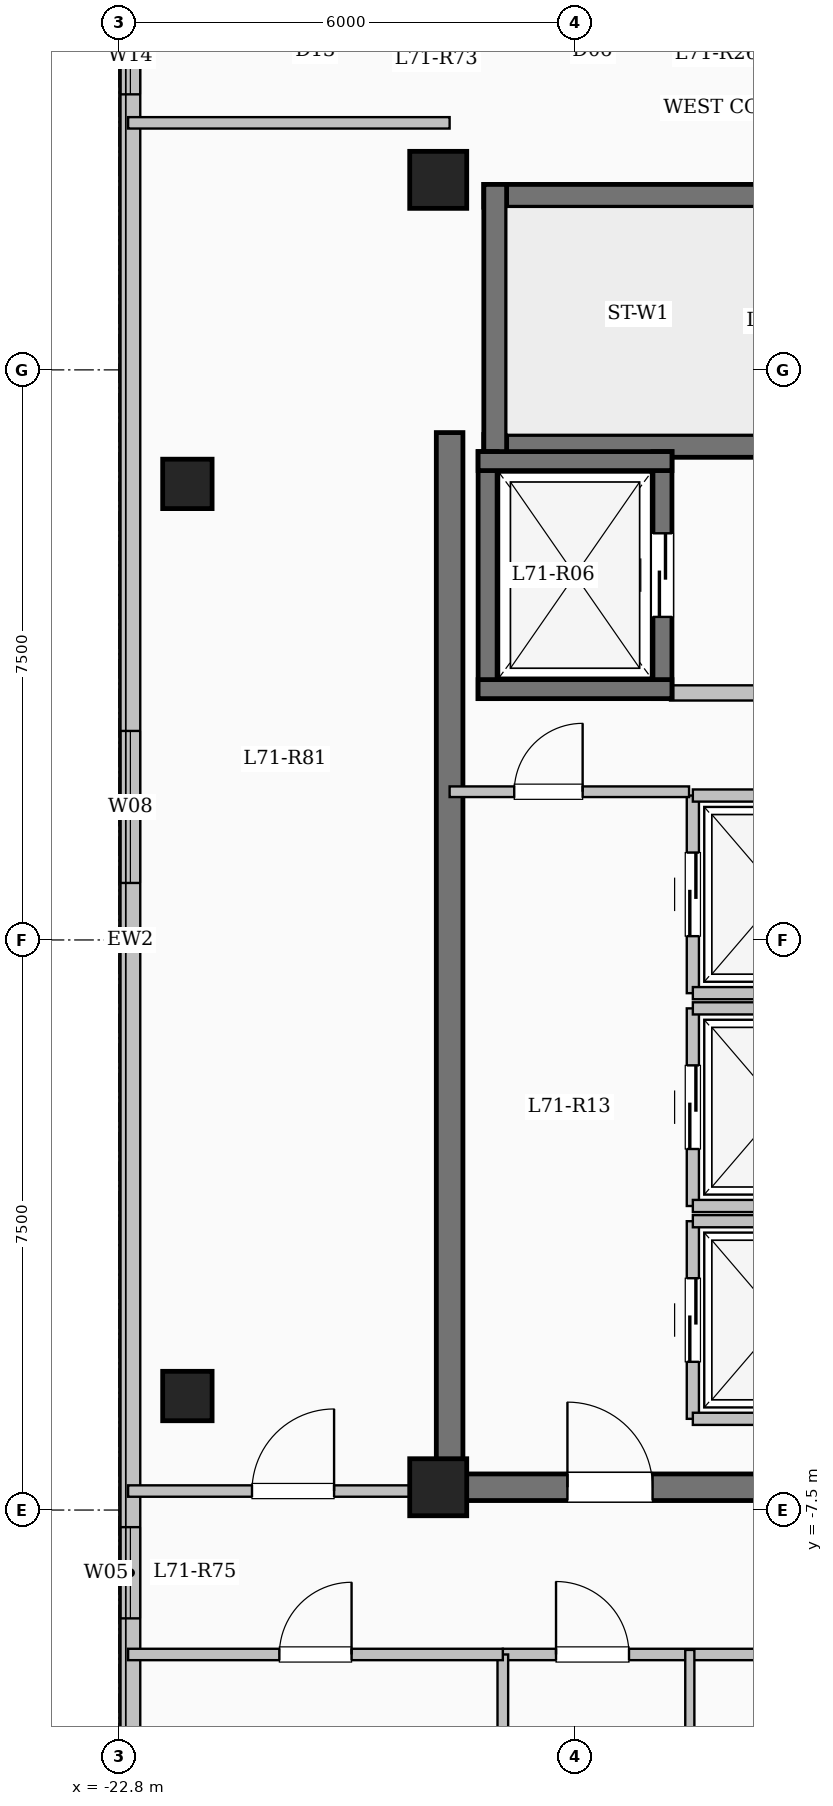
"""IFC4 building model, lengths in metres.
Left out: names, types, materials, properties, quantities, classifications, styles, units other than length and angle.
Written with IfcOpenShell. Run it as: python <this file> out.ifc"""

import sys

from ifc_helpers import new_model, si_unit, direction, frame, frame_2d, origin, origin_2d, place, context, subcontext, project, spatial, rectangle, extrude, element, fill, save


model = new_model("IFC4")
c1 = context("Model", 3, precision=1e-05, world=origin(), true_north=direction((0.0, 1.0)))
c2 = subcontext(c1, "Body", "Model", "MODEL_VIEW")
j1 = project(units=[si_unit("LENGTHUNIT", "METRE"), si_unit("PLANEANGLEUNIT", "RADIAN")], contexts=[c1])
p1 = place(None, origin())
s1 = spatial("IfcSite", under=j1, at=p1, CompositionType="ELEMENT")
p2 = place(p1, origin())
s2 = spatial("IfcBuilding", under=s1, at=p2, CompositionType="ELEMENT")
p3 = place(p2, frame((0.0, 0.0, 261.6)))
s3 = spatial("IfcBuildingStorey", under=s2, at=p3, CompositionType="ELEMENT", Elevation=261.6)
for number, where, z_axis, x_axis in (
    (1, (-18.6, -7.2, 0.0), (0.0, 0.0, 1.0), (1.0, 0.0, 0.0)),
    (2, (-18.6, 10.0, 0.0), (0.0, 0.0, 1.0), (1.0, 0.0, 0.0)),
):
    element("IfcColumn", number, at=place(p3, frame(where, z_axis=z_axis, x_axis=x_axis)), inside=s3, PredefinedType="COLUMN", context=c2, shape_type="SweptSolid", body=[
        extrude(rectangle(XDim=0.75, YDim=0.75, at=origin_2d()), origin(), (0.0, 0.0, 1.0), 3.35),
    ])
for number, where, z_axis, x_axis in (
    (3, (-21.9, -6.0, 0.0), (0.0, 0.0, 1.0), (1.0, 0.0, 0.0)),
    (4, (-21.9, 6.0, 0.0), (0.0, 0.0, 1.0), (1.0, 0.0, 0.0)),
):
    element("IfcColumn", number, at=place(p3, frame(where, z_axis=z_axis, x_axis=x_axis)), inside=s3, PredefinedType="COLUMN", context=c2, shape_type="SweptSolid", body=[
        extrude(rectangle(XDim=0.65, YDim=0.65, at=origin_2d()), origin(), (0.0, 0.0, 1.0), 3.35),
    ])
p4 = place(p3, frame((-22.65, -17.55, 0.0), z_axis=(0.0, 0.0, 1.0), x_axis=(0.0, 1.0, 0.0)))
e5 = element("IfcWall", 5, at=p4, inside=s3, PredefinedType="SOLIDWALL", context=c2, shape_type="SweptSolid", body=[
    extrude(rectangle(XDim=35.1, YDim=0.26, at=frame_2d((17.55, 0.0))), origin(), (0.0, 0.0, 1.0), 3.1),
])
p5 = place(p4, frame((2.975, 0.0, 0.9)))
e6 = element("IfcOpeningElement", 6, at=p5, cuts=e5, PredefinedType="OPENING", context=c2, shape_type="SweptSolid", body=[
    extrude(rectangle(XDim=2.2, YDim=1.75, at=frame_2d((1.1, 0.875))), frame((0.0, 0.14, 0.0), z_axis=(0.0, -1.0, 0.0), x_axis=(1.0, 0.0, 0.0)), (0.0, 0.0, 1.0), 0.28),
])
p6 = place(p4, frame((8.625, 0.0, 0.95)))
e7 = element("IfcOpeningElement", 7, at=p6, cuts=e5, PredefinedType="OPENING", context=c2, shape_type="SweptSolid", body=[
    extrude(rectangle(XDim=1.2, YDim=1.5, at=frame_2d((0.6, 0.75))), frame((0.0, 0.14, 0.0), z_axis=(0.0, -1.0, 0.0), x_axis=(1.0, 0.0, 0.0)), (0.0, 0.0, 1.0), 0.28),
])
p7 = place(p4, frame((18.3, 0.0, 0.9)))
e8 = element("IfcOpeningElement", 8, at=p7, cuts=e5, PredefinedType="OPENING", context=c2, shape_type="SweptSolid", body=[
    extrude(rectangle(XDim=2.0, YDim=1.7, at=frame_2d((1.0, 0.85))), frame((0.0, 0.14, 0.0), z_axis=(0.0, -1.0, 0.0), x_axis=(1.0, 0.0, 0.0)), (0.0, 0.0, 1.0), 0.28),
])
p8 = place(p4, frame((28.675, 0.0, 0.95)))
e9 = element("IfcOpeningElement", 9, at=p8, cuts=e5, PredefinedType="OPENING", context=c2, shape_type="SweptSolid", body=[
    extrude(rectangle(XDim=1.0, YDim=1.5, at=frame_2d((0.5, 0.75))), frame((0.0, 0.14, 0.0), z_axis=(0.0, -1.0, 0.0), x_axis=(1.0, 0.0, 0.0)), (0.0, 0.0, 1.0), 0.28),
])
p9 = place(p4, frame((31.6, 0.0, 0.9)))
e10 = element("IfcOpeningElement", 10, at=p9, cuts=e5, PredefinedType="OPENING", context=c2, shape_type="SweptSolid", body=[
    extrude(rectangle(XDim=2.0, YDim=1.7, at=frame_2d((1.0, 0.85))), frame((0.0, 0.14, 0.0), z_axis=(0.0, -1.0, 0.0), x_axis=(1.0, 0.0, 0.0)), (0.0, 0.0, 1.0), 0.28),
])
p10 = place(p3, frame((-18.0, 9.79, 0.0), z_axis=(0.0, 0.0, 1.0), x_axis=(1.0, 0.0, 0.0)))
e11 = element("IfcWall", 11, at=p10, inside=s3, PredefinedType="SHEAR", context=c2, shape_type="SweptSolid", body=[
    extrude(rectangle(XDim=8.0, YDim=0.3, at=frame_2d((4.0, 0.0))), origin(), (0.0, 0.0, 1.0), 3.35),
])
p11 = place(p3, frame((-18.0, 6.5, 0.0), z_axis=(0.0, 0.0, 1.0), x_axis=(1.0, 0.0, 0.0)))
e12 = element("IfcWall", 12, at=p11, inside=s3, PredefinedType="SHEAR", context=c2, shape_type="SweptSolid", body=[
    extrude(rectangle(XDim=8.0, YDim=0.3, at=frame_2d((4.0, 0.0))), origin(), (0.0, 0.0, 1.0), 3.35),
])
p12 = place(p11, frame((6.45, 0.0, 0.0)))
e13 = element("IfcOpeningElement", 13, at=p12, cuts=e12, PredefinedType="OPENING", context=c2, shape_type="SweptSolid", body=[
    extrude(rectangle(XDim=1.0, YDim=2.15, at=frame_2d((0.5, 1.075))), frame((0.0, 0.16, 0.0), z_axis=(0.0, -1.0, 0.0), x_axis=(1.0, 0.0, 0.0)), (0.0, 0.0, 1.0), 0.32),
])
p13 = place(p3, frame((-17.85, 6.35, 0.0), z_axis=(0.0, 0.0, 1.0), x_axis=(0.0, 1.0, 0.0)))
e14 = element("IfcWall", 14, at=p13, inside=s3, PredefinedType="SHEAR", context=c2, shape_type="SweptSolid", body=[
    extrude(rectangle(XDim=3.59, YDim=0.3, at=frame_2d((1.795, 0.0))), origin(), (0.0, 0.0, 1.0), 3.35),
])
p14 = place(p3, frame((-15.55, 3.25, 0.0), z_axis=(0.0, 0.0, 1.0), x_axis=(1.0, 0.0, 0.0)))
e15 = element("IfcWall", 15, at=p14, inside=s3, PredefinedType="SOLIDWALL", context=c2, shape_type="SweptSolid", body=[
    extrude(rectangle(XDim=5.4, YDim=0.2, at=frame_2d((2.7, 0.0))), origin(), (0.0, 0.0, 1.0), 3.1),
])
p15 = place(p3, frame((-17.95, 3.175, 0.0), z_axis=(0.0, 0.0, 1.0), x_axis=(0.0, 1.0, 0.0)))
e16 = element("IfcWall", 16, at=p15, inside=s3, PredefinedType="SHEAR", context=c2, shape_type="SweptSolid", body=[
    extrude(rectangle(XDim=3.25, YDim=0.25, at=frame_2d((1.625, 0.0))), origin(), (0.0, 0.0, 1.0), 3.35),
])
p16 = place(p3, frame((-15.65, 3.175, 0.0), z_axis=(0.0, 0.0, 1.0), x_axis=(0.0, 1.0, 0.0)))
e17 = element("IfcWall", 17, at=p16, inside=s3, PredefinedType="SHEAR", context=c2, shape_type="SweptSolid", body=[
    extrude(rectangle(XDim=3.25, YDim=0.25, at=frame_2d((1.625, 0.0))), origin(), (0.0, 0.0, 1.0), 3.35),
])
p17 = place(p16, frame((1.075, 0.0, 0.0)))
e18 = element("IfcOpeningElement", 18, at=p17, cuts=e17, PredefinedType="OPENING", context=c2, shape_type="SweptSolid", body=[
    extrude(rectangle(XDim=1.1, YDim=2.15, at=frame_2d((0.55, 1.075))), frame((0.0, 0.135, 0.0), z_axis=(0.0, -1.0, 0.0), x_axis=(1.0, 0.0, 0.0)), (0.0, 0.0, 1.0), 0.27),
])
for number, where, z_axis, x_axis in (
    (19, (-18.075, 3.3, 0.0), (0.0, 0.0, 1.0), (1.0, 0.0, 0.0)),
    (20, (-18.075, 6.3, 0.0), (0.0, 0.0, 1.0), (1.0, 0.0, 0.0)),
):
    element("IfcWall", number, at=place(p3, frame(where, z_axis=z_axis, x_axis=x_axis)), inside=s3, PredefinedType="SHEAR", context=c2, shape_type="SweptSolid", body=[
        extrude(rectangle(XDim=2.55, YDim=0.25, at=frame_2d((1.275, 0.0))), origin(), (0.0, 0.0, 1.0), 3.35),
    ])
p18 = place(p3, frame((-15.25, -6.3, 0.0), z_axis=(0.0, 0.0, 1.0), x_axis=(0.0, 1.0, 0.0)))
e21 = element("IfcWall", 21, at=p18, inside=s3, PredefinedType="SOLIDWALL", context=c2, shape_type="SweptSolid", body=[
    extrude(rectangle(XDim=2.6, YDim=0.16, at=frame_2d((1.3, 0.0))), origin(), (0.0, 0.0, 1.0), 3.1),
])
p19 = place(p18, frame((0.75, 0.0, 0.0)))
e22 = element("IfcOpeningElement", 22, at=p19, cuts=e21, PredefinedType="OPENING", context=c2, shape_type="SweptSolid", body=[
    extrude(rectangle(XDim=1.1, YDim=2.15, at=frame_2d((0.55, 1.075))), frame((0.0, 0.09, 0.0), z_axis=(0.0, -1.0, 0.0), x_axis=(1.0, 0.0, 0.0)), (0.0, 0.0, 1.0), 0.18),
])
for number, where, z_axis, x_axis in (
    (23, (-15.25, -6.3, 0.0), (0.0, 0.0, 1.0), (1.0, 0.0, 0.0)),
    (24, (-15.25, -3.7, 0.0), (0.0, 0.0, 1.0), (1.0, 0.0, 0.0)),
):
    element("IfcWall", number, at=place(p3, frame(where, z_axis=z_axis, x_axis=x_axis)), inside=s3, PredefinedType="SOLIDWALL", context=c2, shape_type="SweptSolid", body=[
        extrude(rectangle(XDim=2.3, YDim=0.16, at=frame_2d((1.15, 0.0))), origin(), (0.0, 0.0, 1.0), 3.1),
    ])
p20 = place(p3, frame((-15.25, -3.5, 0.0), z_axis=(0.0, 0.0, 1.0), x_axis=(0.0, 1.0, 0.0)))
e25 = element("IfcWall", 25, at=p20, inside=s3, PredefinedType="SOLIDWALL", context=c2, shape_type="SweptSolid", body=[
    extrude(rectangle(XDim=2.6, YDim=0.16, at=frame_2d((1.3, 0.0))), origin(), (0.0, 0.0, 1.0), 3.1),
])
p21 = place(p20, frame((0.75, 0.0, 0.0)))
e26 = element("IfcOpeningElement", 26, at=p21, cuts=e25, PredefinedType="OPENING", context=c2, shape_type="SweptSolid", body=[
    extrude(rectangle(XDim=1.1, YDim=2.15, at=frame_2d((0.55, 1.075))), frame((0.0, 0.09, 0.0), z_axis=(0.0, -1.0, 0.0), x_axis=(1.0, 0.0, 0.0)), (0.0, 0.0, 1.0), 0.18),
])
for number, where, z_axis, x_axis in (
    (27, (-15.25, -3.5, 0.0), (0.0, 0.0, 1.0), (1.0, 0.0, 0.0)),
    (28, (-15.25, -0.9, 0.0), (0.0, 0.0, 1.0), (1.0, 0.0, 0.0)),
):
    element("IfcWall", number, at=place(p3, frame(where, z_axis=z_axis, x_axis=x_axis)), inside=s3, PredefinedType="SOLIDWALL", context=c2, shape_type="SweptSolid", body=[
        extrude(rectangle(XDim=2.3, YDim=0.16, at=frame_2d((1.15, 0.0))), origin(), (0.0, 0.0, 1.0), 3.1),
    ])
p22 = place(p3, frame((-15.25, -0.7, 0.0), z_axis=(0.0, 0.0, 1.0), x_axis=(0.0, 1.0, 0.0)))
e29 = element("IfcWall", 29, at=p22, inside=s3, PredefinedType="SOLIDWALL", context=c2, shape_type="SweptSolid", body=[
    extrude(rectangle(XDim=2.6, YDim=0.16, at=frame_2d((1.3, 0.0))), origin(), (0.0, 0.0, 1.0), 3.1),
])
p23 = place(p22, frame((0.75, 0.0, 0.0)))
e30 = element("IfcOpeningElement", 30, at=p23, cuts=e29, PredefinedType="OPENING", context=c2, shape_type="SweptSolid", body=[
    extrude(rectangle(XDim=1.1, YDim=2.15, at=frame_2d((0.55, 1.075))), frame((0.0, 0.09, 0.0), z_axis=(0.0, -1.0, 0.0), x_axis=(1.0, 0.0, 0.0)), (0.0, 0.0, 1.0), 0.18),
])
for number, where, z_axis, x_axis in (
    (31, (-15.25, -0.7, 0.0), (0.0, 0.0, 1.0), (1.0, 0.0, 0.0)),
    (32, (-15.25, 1.9, 0.0), (0.0, 0.0, 1.0), (1.0, 0.0, 0.0)),
):
    element("IfcWall", number, at=place(p3, frame(where, z_axis=z_axis, x_axis=x_axis)), inside=s3, PredefinedType="SOLIDWALL", context=c2, shape_type="SweptSolid", body=[
        extrude(rectangle(XDim=2.3, YDim=0.16, at=frame_2d((1.15, 0.0))), origin(), (0.0, 0.0, 1.0), 3.1),
    ])
p24 = place(p3, frame((-18.45, -7.375, 0.0), z_axis=(0.0, 0.0, 1.0), x_axis=(0.0, 1.0, 0.0)))
e33 = element("IfcWall", 33, at=p24, inside=s3, PredefinedType="SHEAR", context=c2, shape_type="SweptSolid", body=[
    extrude(rectangle(XDim=14.05, YDim=0.35, at=frame_2d((7.025, 0.0))), origin(), (0.0, 0.0, 1.0), 3.35),
])
p25 = place(p3, frame((-18.625, -7.2, 0.0), z_axis=(0.0, 0.0, 1.0), x_axis=(1.0, 0.0, 0.0)))
e34 = element("IfcWall", 34, at=p25, inside=s3, PredefinedType="SHEAR", context=c2, shape_type="SweptSolid", body=[
    extrude(rectangle(XDim=8.55, YDim=0.35, at=frame_2d((4.275, 0.0))), origin(), (0.0, 0.0, 1.0), 3.35),
])
p26 = place(p25, frame((1.725, 0.0, 0.0)))
e35 = element("IfcOpeningElement", 35, at=p26, cuts=e34, PredefinedType="OPENING", context=c2, shape_type="SweptSolid", body=[
    extrude(rectangle(XDim=1.12, YDim=2.15, at=frame_2d((0.56, 1.075))), frame((0.0, 0.185, 0.0), z_axis=(0.0, -1.0, 0.0), x_axis=(1.0, 0.0, 0.0)), (0.0, 0.0, 1.0), 0.37),
])
p27 = place(p3, frame((-18.45, 1.95, 0.0), z_axis=(0.0, 0.0, 1.0), x_axis=(1.0, 0.0, 0.0)))
e36 = element("IfcWall", 36, at=p27, inside=s3, PredefinedType="PARTITIONING", context=c2, shape_type="SweptSolid", body=[
    extrude(rectangle(XDim=3.15, YDim=0.14, at=frame_2d((1.575, 0.0))), origin(), (0.0, 0.0, 1.0), 3.1),
])
p28 = place(p27, frame((0.85, 0.0, 0.0)))
e37 = element("IfcOpeningElement", 37, at=p28, cuts=e36, PredefinedType="OPENING", context=c2, shape_type="SweptSolid", body=[
    extrude(rectangle(XDim=0.9, YDim=2.08, at=frame_2d((0.45, 1.04))), frame((0.0, 0.08, 0.0), z_axis=(0.0, -1.0, 0.0), x_axis=(1.0, 0.0, 0.0)), (0.0, 0.0, 1.0), 0.16),
])
p29 = place(p3, frame((-17.75, -9.4, 0.0), z_axis=(0.0, 0.0, 1.0), x_axis=(1.0, 0.0, 0.0)))
e38 = element("IfcWall", 38, at=p29, inside=s3, PredefinedType="PARTITIONING", context=c2, shape_type="SweptSolid", body=[
    extrude(rectangle(XDim=9.2, YDim=0.15, at=frame_2d((4.6, 0.0))), origin(), (0.0, 0.0, 1.0), 3.1),
])
p30 = place(p29, frame((0.7, 0.0, 0.0)))
e39 = element("IfcOpeningElement", 39, at=p30, cuts=e38, PredefinedType="OPENING", context=c2, shape_type="SweptSolid", body=[
    extrude(rectangle(XDim=0.96, YDim=2.15, at=frame_2d((0.48, 1.075))), frame((0.0, 0.085, 0.0), z_axis=(0.0, -1.0, 0.0), x_axis=(1.0, 0.0, 0.0)), (0.0, 0.0, 1.0), 0.17),
])
p31 = place(p29, frame((5.275, 0.0, 0.0)))
e40 = element("IfcOpeningElement", 40, at=p31, cuts=e38, PredefinedType="OPENING", context=c2, shape_type="SweptSolid", body=[
    extrude(rectangle(XDim=0.96, YDim=2.15, at=frame_2d((0.48, 1.075))), frame((0.0, 0.085, 0.0), z_axis=(0.0, -1.0, 0.0), x_axis=(1.0, 0.0, 0.0)), (0.0, 0.0, 1.0), 0.17),
])
p32 = place(p3, frame((-15.29, -12.56, 0.0), z_axis=(0.0, 0.0, 1.0), x_axis=(0.0, 1.0, 0.0)))
e41 = element("IfcWall", 41, at=p32, inside=s3, PredefinedType="PARTITIONING", context=c2, shape_type="SweptSolid", body=[
    extrude(rectangle(XDim=3.22, YDim=0.12, at=frame_2d((1.61, 0.0))), origin(), (0.0, 0.0, 1.0), 2.685),
])
p33 = place(p32, frame((1.14, 0.0, 0.0)))
e42 = element("IfcOpeningElement", 42, at=p33, cuts=e41, PredefinedType="OPENING", context=c2, shape_type="SweptSolid", body=[
    extrude(rectangle(XDim=0.88, YDim=2.1, at=frame_2d((0.44, 1.05))), frame((0.0, 0.07, 0.0), z_axis=(0.0, -1.0, 0.0), x_axis=(1.0, 0.0, 0.0)), (0.0, 0.0, 1.0), 0.14),
])
p34 = place(p3, frame((-22.68, -7.25, 0.0), z_axis=(0.0, 0.0, 1.0), x_axis=(1.0, 0.0, 0.0)))
e43 = element("IfcWall", 43, at=p34, inside=s3, PredefinedType="PARTITIONING", context=c2, shape_type="SweptSolid", body=[
    extrude(rectangle(XDim=4.23, YDim=0.15, at=frame_2d((2.115, 0.0))), origin(), (0.0, 0.0, 1.0), 3.1),
])
p35 = place(p34, frame((1.63, 0.0, 0.0)))
e44 = element("IfcOpeningElement", 44, at=p35, cuts=e43, PredefinedType="OPENING", context=c2, shape_type="SweptSolid", body=[
    extrude(rectangle(XDim=1.08, YDim=2.15, at=frame_2d((0.54, 1.075))), frame((0.0, 0.085, 0.0), z_axis=(0.0, -1.0, 0.0), x_axis=(1.0, 0.0, 0.0)), (0.0, 0.0, 1.0), 0.17),
])
p36 = place(p3, frame((-22.68, 10.75, 0.0), z_axis=(0.0, 0.0, 1.0), x_axis=(1.0, 0.0, 0.0)))
e45 = element("IfcWall", 45, at=p36, inside=s3, PredefinedType="PARTITIONING", context=c2, shape_type="SweptSolid", body=[
    extrude(rectangle(XDim=4.23, YDim=0.15, at=frame_2d((2.115, 0.0))), origin(), (0.0, 0.0, 1.0), 3.1),
])
p37 = place(p3, frame((-17.75, -17.55, 0.0), z_axis=(0.0, 0.0, 1.0), x_axis=(0.0, 1.0, 0.0)))
e46 = element("IfcWall", 46, at=p37, inside=s3, PredefinedType="PARTITIONING", context=c2, shape_type="SweptSolid", body=[
    extrude(rectangle(XDim=8.15, YDim=0.14, at=frame_2d((4.075, 0.0))), origin(), (0.0, 0.0, 1.0), 3.1),
])
p38 = place(p3, frame((-22.68, -9.4, 0.0), z_axis=(0.0, 0.0, 1.0), x_axis=(1.0, 0.0, 0.0)))
e47 = element("IfcWall", 47, at=p38, inside=s3, PredefinedType="PARTITIONING", context=c2, shape_type="SweptSolid", body=[
    extrude(rectangle(XDim=4.93, YDim=0.15, at=frame_2d((2.465, 0.0))), origin(), (0.0, 0.0, 1.0), 3.1),
])
p39 = place(p38, frame((1.99, 0.0, 0.0)))
e48 = element("IfcOpeningElement", 48, at=p39, cuts=e47, PredefinedType="OPENING", context=c2, shape_type="SweptSolid", body=[
    extrude(rectangle(XDim=0.95, YDim=2.15, at=frame_2d((0.475, 1.075))), frame((0.0, 0.085, 0.0), z_axis=(0.0, -1.0, 0.0), x_axis=(1.0, 0.0, 0.0)), (0.0, 0.0, 1.0), 0.17),
])
p40 = place(p6, origin())
e49 = element("IfcWindow", 49, at=p40, inside=s3, PartitioningType="SINGLE_PANEL", PredefinedType="WINDOW", context=c2, shape_type="SweptSolid", body=[
    extrude(rectangle(XDim=1.2, YDim=1.5, at=frame_2d((0.6, 0.75))), frame((0.0, 0.03, 0.0), z_axis=(0.0, -1.0, 0.0), x_axis=(1.0, 0.0, 0.0)), (0.0, 0.0, 1.0), 0.06),
])
fill(e7, e49)
p41 = place(p7, origin())
e50 = element("IfcWindow", 50, at=p41, inside=s3, PartitioningType="SINGLE_PANEL", PredefinedType="WINDOW", context=c2, shape_type="SweptSolid", body=[
    extrude(rectangle(XDim=2.0, YDim=1.7, at=frame_2d((1.0, 0.85))), frame((0.0, 0.03, 0.0), z_axis=(0.0, -1.0, 0.0), x_axis=(1.0, 0.0, 0.0)), (0.0, 0.0, 1.0), 0.06),
])
fill(e8, e50)
p42 = place(p8, origin())
e51 = element("IfcWindow", 51, at=p42, inside=s3, PartitioningType="SINGLE_PANEL", PredefinedType="WINDOW", context=c2, shape_type="SweptSolid", body=[
    extrude(rectangle(XDim=1.0, YDim=1.5, at=frame_2d((0.5, 0.75))), frame((0.0, 0.03, 0.0), z_axis=(0.0, -1.0, 0.0), x_axis=(1.0, 0.0, 0.0)), (0.0, 0.0, 1.0), 0.06),
])
fill(e9, e51)
p43 = place(p17, origin())
e52 = element("IfcDoor", 52, at=p43, inside=s3, OperationType="SLIDING_TO_LEFT", PredefinedType="DOOR", context=c2, shape_type="SweptSolid", body=[
    extrude(rectangle(XDim=1.1, YDim=2.15, at=frame_2d((0.55, 1.075))), frame((0.0, 0.025, 0.0), z_axis=(0.0, -1.0, 0.0), x_axis=(1.0, 0.0, 0.0)), (0.0, 0.0, 1.0), 0.05),
])
fill(e18, e52)
p44 = place(p19, origin())
e53 = element("IfcDoor", 53, at=p44, inside=s3, OperationType="SLIDING_TO_LEFT", PredefinedType="DOOR", context=c2, shape_type="SweptSolid", body=[
    extrude(rectangle(XDim=1.1, YDim=2.15, at=frame_2d((0.55, 1.075))), frame((0.0, 0.025, 0.0), z_axis=(0.0, -1.0, 0.0), x_axis=(1.0, 0.0, 0.0)), (0.0, 0.0, 1.0), 0.05),
])
fill(e22, e53)
p45 = place(p21, origin())
e54 = element("IfcDoor", 54, at=p45, inside=s3, OperationType="SLIDING_TO_LEFT", PredefinedType="DOOR", context=c2, shape_type="SweptSolid", body=[
    extrude(rectangle(XDim=1.1, YDim=2.15, at=frame_2d((0.55, 1.075))), frame((0.0, 0.025, 0.0), z_axis=(0.0, -1.0, 0.0), x_axis=(1.0, 0.0, 0.0)), (0.0, 0.0, 1.0), 0.05),
])
fill(e26, e54)
p46 = place(p23, origin())
e55 = element("IfcDoor", 55, at=p46, inside=s3, OperationType="SLIDING_TO_LEFT", PredefinedType="DOOR", context=c2, shape_type="SweptSolid", body=[
    extrude(rectangle(XDim=1.1, YDim=2.15, at=frame_2d((0.55, 1.075))), frame((0.0, 0.025, 0.0), z_axis=(0.0, -1.0, 0.0), x_axis=(1.0, 0.0, 0.0)), (0.0, 0.0, 1.0), 0.05),
])
fill(e30, e55)
p47 = place(p26, origin())
e56 = element("IfcDoor", 56, at=p47, inside=s3, OperationType="SINGLE_SWING_LEFT", PredefinedType="DOOR", context=c2, shape_type="SweptSolid", body=[
    extrude(rectangle(XDim=1.12, YDim=2.15, at=frame_2d((0.56, 1.075))), frame((0.0, 0.025, 0.0), z_axis=(0.0, -1.0, 0.0), x_axis=(1.0, 0.0, 0.0)), (0.0, 0.0, 1.0), 0.05),
])
fill(e35, e56)
p48 = place(p28, origin())
e57 = element("IfcDoor", 57, at=p48, inside=s3, OperationType="SINGLE_SWING_RIGHT", PredefinedType="DOOR", context=c2, shape_type="SweptSolid", body=[
    extrude(rectangle(XDim=0.9, YDim=2.08, at=frame_2d((0.45, 1.04))), frame((0.0, 0.025, 0.0), z_axis=(0.0, -1.0, 0.0), x_axis=(1.0, 0.0, 0.0)), (0.0, 0.0, 1.0), 0.05),
])
fill(e37, e57)
p49 = place(p30, origin())
e58 = element("IfcDoor", 58, at=p49, inside=s3, OperationType="SINGLE_SWING_LEFT", PredefinedType="DOOR", context=c2, shape_type="SweptSolid", body=[
    extrude(rectangle(XDim=0.96, YDim=2.15, at=frame_2d((0.48, 1.075))), frame((0.0, 0.025, 0.0), z_axis=(0.0, -1.0, 0.0), x_axis=(1.0, 0.0, 0.0)), (0.0, 0.0, 1.0), 0.05),
])
fill(e39, e58)
p50 = place(p39, origin())
e59 = element("IfcDoor", 59, at=p50, inside=s3, OperationType="SINGLE_SWING_RIGHT", PredefinedType="DOOR", context=c2, shape_type="SweptSolid", body=[
    extrude(rectangle(XDim=0.95, YDim=2.15, at=frame_2d((0.475, 1.075))), frame((0.0, 0.025, 0.0), z_axis=(0.0, -1.0, 0.0), x_axis=(1.0, 0.0, 0.0)), (0.0, 0.0, 1.0), 0.05),
])
fill(e48, e59)
p51 = place(p35, origin())
e60 = element("IfcDoor", 60, at=p51, inside=s3, OperationType="SINGLE_SWING_RIGHT", PredefinedType="DOOR", context=c2, shape_type="SweptSolid", body=[
    extrude(rectangle(XDim=1.08, YDim=2.15, at=frame_2d((0.54, 1.075))), frame((0.0, 0.025, 0.0), z_axis=(0.0, -1.0, 0.0), x_axis=(1.0, 0.0, 0.0)), (0.0, 0.0, 1.0), 0.05),
])
fill(e44, e60)
save(model, sys.argv[1])
